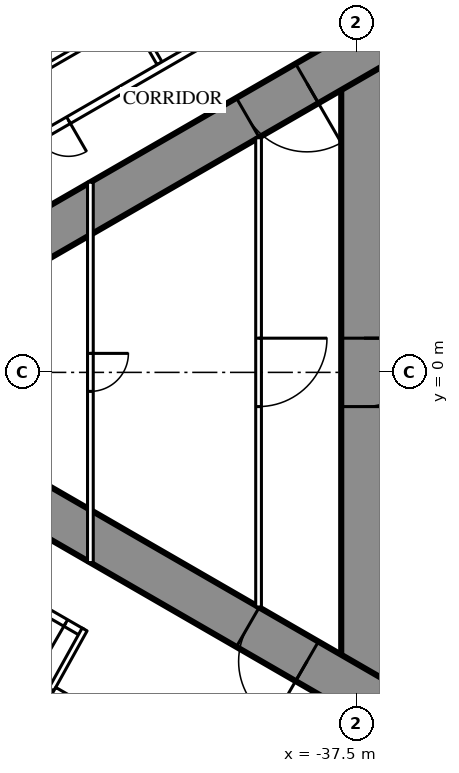
"""IFC4 building model, lengths in metres.
Left out: names, types, materials, properties, quantities, classifications, styles, units other than length and angle.
Written with IfcOpenShell. Run it as: python <this file> out.ifc"""

import sys

from ifc_helpers import new_model, si_unit, direction, frame, frame_2d, origin, place, context, subcontext, project, spatial, rectangle, extrude, element, fill, save


model = new_model("IFC4")
c1 = context("Model", 3, precision=1e-05, world=origin(), true_north=direction((0.0, 1.0)))
c2 = subcontext(c1, "Body", "Model", "MODEL_VIEW")
j1 = project(units=[si_unit("LENGTHUNIT", "METRE"), si_unit("PLANEANGLEUNIT", "RADIAN")], contexts=[c1])
p1 = place(None, origin())
s1 = spatial("IfcSite", under=j1, at=p1, CompositionType="ELEMENT")
p2 = place(p1, origin())
s2 = spatial("IfcBuilding", under=s1, at=p2, CompositionType="ELEMENT")
p3 = place(p2, frame((0.0, 0.0, 229.7)))
s3 = spatial("IfcBuildingStorey", under=s2, at=p3, CompositionType="ELEMENT", Elevation=229.7)
p4 = place(p3, frame((-37.3, 8.6, 0.0), z_axis=(0.0, 0.0, 1.0), x_axis=(0.0, -1.0, 0.0)))
e1 = element("IfcWall", 1, at=p4, inside=s3, PredefinedType="SHEAR", context=c2, shape_type="SweptSolid", body=[
    extrude(rectangle(XDim=17.2, YDim=1.2, at=frame_2d((8.6, 0.0))), origin(), (0.0, 0.0, 1.0), 3.6),
])
p5 = place(p4, frame((7.7, 0.0, 0.0)))
e2 = element("IfcOpeningElement", 2, at=p5, cuts=e1, PredefinedType="OPENING", context=c2, shape_type="SweptSolid", body=[
    extrude(rectangle(XDim=1.8, YDim=2.2, at=frame_2d((0.9, 1.1))), frame((0.0, 0.61, 0.0), z_axis=(0.0, -1.0, 0.0), x_axis=(1.0, 0.0, 0.0)), (0.0, 0.0, 1.0), 1.22),
])
p6 = place(p3, frame((-27.2, 14.3, 0.0), z_axis=(0.0, 0.0, 1.0), x_axis=(-0.866026593062, -0.499997940104, 0.0)))
e3 = element("IfcWall", 3, at=p6, inside=s3, PredefinedType="SHEAR", context=c2, shape_type="SweptSolid", body=[
    extrude(rectangle(XDim=28.946, YDim=1.2, at=frame_2d((14.473, 0.0))), origin(), (0.0, 0.0, 1.0), 3.6),
])
p7 = place(p6, frame((4.6, 0.0, 0.0)))
e4 = element("IfcOpeningElement", 4, at=p7, cuts=e3, PredefinedType="OPENING", context=c2, shape_type="SweptSolid", body=[
    extrude(rectangle(XDim=1.0, YDim=2.2, at=frame_2d((0.5, 1.1))), frame((0.0, 0.61, 0.0), z_axis=(0.0, -1.0, 0.0), x_axis=(1.0, 0.0, 0.0)), (0.0, 0.0, 1.0), 1.22),
])
p8 = place(p6, frame((13.395, 0.0, 0.0)))
e5 = element("IfcOpeningElement", 5, at=p8, cuts=e3, PredefinedType="OPENING", context=c2, shape_type="SweptSolid", body=[
    extrude(rectangle(XDim=1.8, YDim=2.2, at=frame_2d((0.9, 1.1))), frame((0.0, 0.61, 0.0), z_axis=(0.0, -1.0, 0.0), x_axis=(1.0, 0.0, 0.0)), (0.0, 0.0, 1.0), 1.22),
])
p9 = place(p3, frame((-27.2, -14.3, 0.0), z_axis=(0.0, 0.0, 1.0), x_axis=(-0.866024021859, 0.500002393557, 0.0)))
e6 = element("IfcWall", 6, at=p9, inside=s3, PredefinedType="SHEAR", context=c2, shape_type="SweptSolid", body=[
    extrude(rectangle(XDim=27.907, YDim=1.2, at=frame_2d((13.954, 0.0))), origin(), (0.0, 0.0, 1.0), 3.6),
])
p10 = place(p9, frame((4.6, 0.0, 0.0)))
e7 = element("IfcOpeningElement", 7, at=p10, cuts=e6, PredefinedType="OPENING", context=c2, shape_type="SweptSolid", body=[
    extrude(rectangle(XDim=1.0, YDim=2.2, at=frame_2d((0.5, 1.1))), frame((0.0, 0.61, 0.0), z_axis=(0.0, -1.0, 0.0), x_axis=(1.0, 0.0, 0.0)), (0.0, 0.0, 1.0), 1.22),
])
p11 = place(p9, frame((13.395, 0.0, 0.0)))
e8 = element("IfcOpeningElement", 8, at=p11, cuts=e6, PredefinedType="OPENING", context=c2, shape_type="SweptSolid", body=[
    extrude(rectangle(XDim=1.8, YDim=2.2, at=frame_2d((0.9, 1.1))), frame((0.0, 0.61, 0.0), z_axis=(0.0, -1.0, 0.0), x_axis=(1.0, 0.0, 0.0)), (0.0, 0.0, 1.0), 1.22),
])
p12 = place(p3, frame((-42.68, 8.134, 0.0), z_axis=(0.0, 0.0, 1.0), x_axis=(-0.499984479505, 0.866034364361, 0.0)))
e9 = element("IfcWall", 9, at=p12, inside=s3, PredefinedType="PARTITIONING", context=c2, shape_type="SweptSolid", body=[
    extrude(rectangle(XDim=5.995, YDim=0.15, at=frame_2d((2.998, 0.0))), origin(), (0.0, 0.0, 1.0), 2.45),
])
p13 = place(p3, frame((-44.715, -6.844, 0.0), z_axis=(0.0, 0.0, 1.0), x_axis=(-0.866025261224, 0.500000246922, 0.0)))
e10 = element("IfcWall", 10, at=p13, inside=s3, PredefinedType="PARTITIONING", context=c2, shape_type="SweptSolid", body=[
    extrude(rectangle(XDim=13.567, YDim=0.2, at=frame_2d((6.783, 0.0))), origin(), (0.0, 0.0, 1.0), 3.35),
])
p14 = place(p13, frame((6.266, 0.0, 0.0)))
e11 = element("IfcOpeningElement", 11, at=p14, cuts=e10, PredefinedType="OPENING", context=c2, shape_type="SweptSolid", body=[
    extrude(rectangle(XDim=0.95, YDim=2.2, at=frame_2d((0.475, 1.1))), frame((0.0, 0.11, 0.0), z_axis=(0.0, -1.0, 0.0), x_axis=(1.0, 0.0, 0.0)), (0.0, 0.0, 1.0), 0.22),
])
p15 = place(p13, frame((4.565, 0.0, 0.0)))
e12 = element("IfcOpeningElement", 12, at=p15, cuts=e10, PredefinedType="OPENING", context=c2, shape_type="SweptSolid", body=[
    extrude(rectangle(XDim=0.95, YDim=2.2, at=frame_2d((0.475, 1.1))), frame((0.0, 0.11, 0.0), z_axis=(0.0, -1.0, 0.0), x_axis=(1.0, 0.0, 0.0)), (0.0, 0.0, 1.0), 0.22),
])
p16 = place(p13, frame((0.5, 0.0, 0.0)))
e13 = element("IfcOpeningElement", 13, at=p16, cuts=e10, PredefinedType="OPENING", context=c2, shape_type="SweptSolid", body=[
    extrude(rectangle(XDim=0.967, YDim=2.2, at=frame_2d((0.483, 1.1))), frame((0.0, 0.11, 0.0), z_axis=(0.0, -1.0, 0.0), x_axis=(1.0, 0.0, 0.0)), (0.0, 0.0, 1.0), 0.22),
])
p17 = place(p3, frame((-44.652, -6.764, 0.0), z_axis=(0.0, 0.0, 1.0), x_axis=(-0.485424724123, -0.874278466629, 0.0)))
e14 = element("IfcWall", 14, at=p17, inside=s3, PredefinedType="PARTITIONING", context=c2, shape_type="SweptSolid", body=[
    extrude(rectangle(XDim=1.805, YDim=0.15, at=frame_2d((0.903, 0.0))), origin(), (0.0, 0.0, 1.0), 3.35),
])
p18 = place(p3, frame((-44.765, 8.546, 0.0), z_axis=(0.0, 0.0, 1.0), x_axis=(-0.86604923931, -0.499958713387, 0.0)))
e15 = element("IfcWall", 15, at=p18, inside=s3, PredefinedType="PARTITIONING", context=c2, shape_type="SweptSolid", body=[
    extrude(rectangle(XDim=2.475, YDim=0.15, at=frame_2d((1.237, 0.0))), origin(), (0.0, 0.0, 1.0), 3.35),
])
p19 = place(p3, frame((-28.737, 16.068, 0.0), z_axis=(0.0, 0.0, 1.0), x_axis=(-0.866023901326, -0.500002602325, 0.0)))
e16 = element("IfcWall", 16, at=p19, inside=s3, PredefinedType="PARTITIONING", context=c2, shape_type="SweptSolid", body=[
    extrude(rectangle(XDim=20.192, YDim=0.2, at=frame_2d((10.096, 0.0))), origin(), (0.0, 0.0, 1.0), 3.35),
])
p20 = place(p19, frame((1.08, 0.0, 0.0)))
e17 = element("IfcOpeningElement", 17, at=p20, cuts=e16, PredefinedType="OPENING", context=c2, shape_type="SweptSolid", body=[
    extrude(rectangle(XDim=1.8, YDim=2.04, at=frame_2d((0.9, 1.02))), frame((0.0, 0.11, 0.0), z_axis=(0.0, -1.0, 0.0), x_axis=(1.0, 0.0, 0.0)), (0.0, 0.0, 1.0), 0.22),
])
p21 = place(p19, frame((6.86, 0.0, 0.0)))
e18 = element("IfcOpeningElement", 18, at=p21, cuts=e16, PredefinedType="OPENING", context=c2, shape_type="SweptSolid", body=[
    extrude(rectangle(XDim=1.0, YDim=2.2, at=frame_2d((0.5, 1.1))), frame((0.0, 0.11, 0.0), z_axis=(0.0, -1.0, 0.0), x_axis=(1.0, 0.0, 0.0)), (0.0, 0.0, 1.0), 0.22),
])
p22 = place(p19, frame((18.867, 0.0, 0.0)))
e19 = element("IfcOpeningElement", 19, at=p22, cuts=e16, PredefinedType="OPENING", context=c2, shape_type="SweptSolid", body=[
    extrude(rectangle(XDim=0.95, YDim=2.2, at=frame_2d((0.475, 1.1))), frame((0.0, 0.11, 0.0), z_axis=(0.0, -1.0, 0.0), x_axis=(1.0, 0.0, 0.0)), (0.0, 0.0, 1.0), 0.22),
])
p23 = place(p3, frame((-40.075, 6.174, 0.0), z_axis=(0.0, 0.0, 1.0), x_axis=(0.0, -1.0, 0.0)))
e20 = element("IfcWall", 20, at=p23, inside=s3, PredefinedType="PARTITIONING", context=c2, shape_type="SweptSolid", body=[
    extrude(rectangle(XDim=12.348, YDim=0.15, at=frame_2d((6.174, 0.0))), origin(), (0.0, 0.0, 1.0), 3.35),
])
p24 = place(p23, frame((5.274, 0.0, 0.0)))
e21 = element("IfcOpeningElement", 21, at=p24, cuts=e20, PredefinedType="OPENING", context=c2, shape_type="SweptSolid", body=[
    extrude(rectangle(XDim=1.8, YDim=2.2, at=frame_2d((0.9, 1.1))), frame((0.0, 0.085, 0.0), z_axis=(0.0, -1.0, 0.0), x_axis=(1.0, 0.0, 0.0)), (0.0, 0.0, 1.0), 0.17),
])
p25 = place(p3, frame((-44.5, 5.005, 0.0), z_axis=(0.0, 0.0, 1.0), x_axis=(0.0, -1.0, 0.0)))
e22 = element("IfcWall", 22, at=p25, inside=s3, PredefinedType="PARTITIONING", context=c2, shape_type="SweptSolid", body=[
    extrude(rectangle(XDim=10.009, YDim=0.15, at=frame_2d((5.005, 0.0))), origin(), (0.0, 0.0, 1.0), 2.5),
])
p26 = place(p25, frame((4.505, 0.0, 0.0)))
e23 = element("IfcOpeningElement", 23, at=p26, cuts=e22, PredefinedType="OPENING", context=c2, shape_type="SweptSolid", body=[
    extrude(rectangle(XDim=1.0, YDim=2.2, at=frame_2d((0.5, 1.1))), frame((0.0, 0.085, 0.0), z_axis=(0.0, -1.0, 0.0), x_axis=(1.0, 0.0, 0.0)), (0.0, 0.0, 1.0), 0.17),
])
p27 = place(p3, frame((-39.758, -11.697, 0.0), z_axis=(0.0, 0.0, 1.0), x_axis=(-0.866024194504, 0.500002094529, 0.0)))
e24 = element("IfcWall", 24, at=p27, inside=s3, PredefinedType="PARTITIONING", context=c2, shape_type="SweptSolid", body=[
    extrude(rectangle(XDim=6.6, YDim=0.25, at=frame_2d((3.3, 0.0))), origin(), (0.0, 0.0, 1.0), 3.35),
])
p28 = place(p27, frame((0.75, 0.0, 0.0)))
e25 = element("IfcOpeningElement", 25, at=p28, cuts=e24, PredefinedType="OPENING", context=c2, shape_type="SweptSolid", body=[
    extrude(rectangle(XDim=1.1, YDim=2.2, at=frame_2d((0.55, 1.1))), frame((0.0, 0.135, 0.0), z_axis=(0.0, -1.0, 0.0), x_axis=(1.0, 0.0, 0.0)), (0.0, 0.0, 1.0), 0.27),
])
p29 = place(p27, frame((2.75, 0.0, 0.0)))
e26 = element("IfcOpeningElement", 26, at=p29, cuts=e24, PredefinedType="OPENING", context=c2, shape_type="SweptSolid", body=[
    extrude(rectangle(XDim=1.1, YDim=2.2, at=frame_2d((0.55, 1.1))), frame((0.0, 0.135, 0.0), z_axis=(0.0, -1.0, 0.0), x_axis=(1.0, 0.0, 0.0)), (0.0, 0.0, 1.0), 0.27),
])
p30 = place(p27, frame((4.75, 0.0, 0.0)))
e27 = element("IfcOpeningElement", 27, at=p30, cuts=e24, PredefinedType="OPENING", context=c2, shape_type="SweptSolid", body=[
    extrude(rectangle(XDim=1.1, YDim=2.2, at=frame_2d((0.55, 1.1))), frame((0.0, 0.135, 0.0), z_axis=(0.0, -1.0, 0.0), x_axis=(1.0, 0.0, 0.0)), (0.0, 0.0, 1.0), 0.27),
])
p31 = place(p22, origin())
e28 = element("IfcDoor", 28, at=p31, inside=s3, OperationType="SINGLE_SWING_LEFT", PredefinedType="DOOR", context=c2, shape_type="SweptSolid", body=[
    extrude(rectangle(XDim=0.95, YDim=2.2, at=frame_2d((0.475, 1.1))), frame((0.0, 0.025, 0.0), z_axis=(0.0, -1.0, 0.0), x_axis=(1.0, 0.0, 0.0)), (0.0, 0.0, 1.0), 0.05),
])
fill(e19, e28)
p32 = place(p16, origin())
e29 = element("IfcDoor", 29, at=p32, inside=s3, OperationType="SINGLE_SWING_LEFT", PredefinedType="DOOR", context=c2, shape_type="SweptSolid", body=[
    extrude(rectangle(XDim=0.967, YDim=2.2, at=frame_2d((0.483, 1.1))), frame((0.0, 0.025, 0.0), z_axis=(0.0, -1.0, 0.0), x_axis=(1.0, 0.0, 0.0)), (0.0, 0.0, 1.0), 0.05),
])
fill(e13, e29)
p33 = place(p24, origin())
e30 = element("IfcDoor", 30, at=p33, inside=s3, OperationType="DOUBLE_DOOR_SINGLE_SWING", PredefinedType="DOOR", context=c2, shape_type="SweptSolid", body=[
    extrude(rectangle(XDim=1.8, YDim=2.2, at=frame_2d((0.9, 1.1))), frame((0.0, 0.025, 0.0), z_axis=(0.0, -1.0, 0.0), x_axis=(1.0, 0.0, 0.0)), (0.0, 0.0, 1.0), 0.05),
])
fill(e21, e30)
p34 = place(p26, origin())
e31 = element("IfcDoor", 31, at=p34, inside=s3, OperationType="SINGLE_SWING_LEFT", PredefinedType="DOOR", context=c2, shape_type="SweptSolid", body=[
    extrude(rectangle(XDim=1.0, YDim=2.2, at=frame_2d((0.5, 1.1))), frame((0.0, 0.025, 0.0), z_axis=(0.0, -1.0, 0.0), x_axis=(1.0, 0.0, 0.0)), (0.0, 0.0, 1.0), 0.05),
])
fill(e23, e31)
p35 = place(p8, origin())
e32 = element("IfcDoor", 32, at=p35, inside=s3, OperationType="DOUBLE_DOOR_SINGLE_SWING", PredefinedType="DOOR", context=c2, shape_type="SweptSolid", body=[
    extrude(rectangle(XDim=1.8, YDim=2.2, at=frame_2d((0.9, 1.1))), frame((0.0, 0.025, 0.0), z_axis=(0.0, -1.0, 0.0), x_axis=(1.0, 0.0, 0.0)), (0.0, 0.0, 1.0), 0.05),
])
fill(e5, e32)
p36 = place(p11, origin())
e33 = element("IfcDoor", 33, at=p36, inside=s3, OperationType="DOUBLE_DOOR_SINGLE_SWING", PredefinedType="DOOR", context=c2, shape_type="SweptSolid", body=[
    extrude(rectangle(XDim=1.8, YDim=2.2, at=frame_2d((0.9, 1.1))), frame((0.0, 0.025, 0.0), z_axis=(0.0, -1.0, 0.0), x_axis=(1.0, 0.0, 0.0)), (0.0, 0.0, 1.0), 0.05),
])
fill(e8, e33)
p37 = place(p5, origin())
e34 = element("IfcDoor", 34, at=p37, inside=s3, OperationType="DOUBLE_DOOR_SINGLE_SWING", PredefinedType="DOOR", context=c2, shape_type="SweptSolid", body=[
    extrude(rectangle(XDim=1.8, YDim=2.2, at=frame_2d((0.9, 1.1))), frame((0.0, 0.025, 0.0), z_axis=(0.0, -1.0, 0.0), x_axis=(1.0, 0.0, 0.0)), (0.0, 0.0, 1.0), 0.05),
])
fill(e2, e34)
save(model, sys.argv[1])
